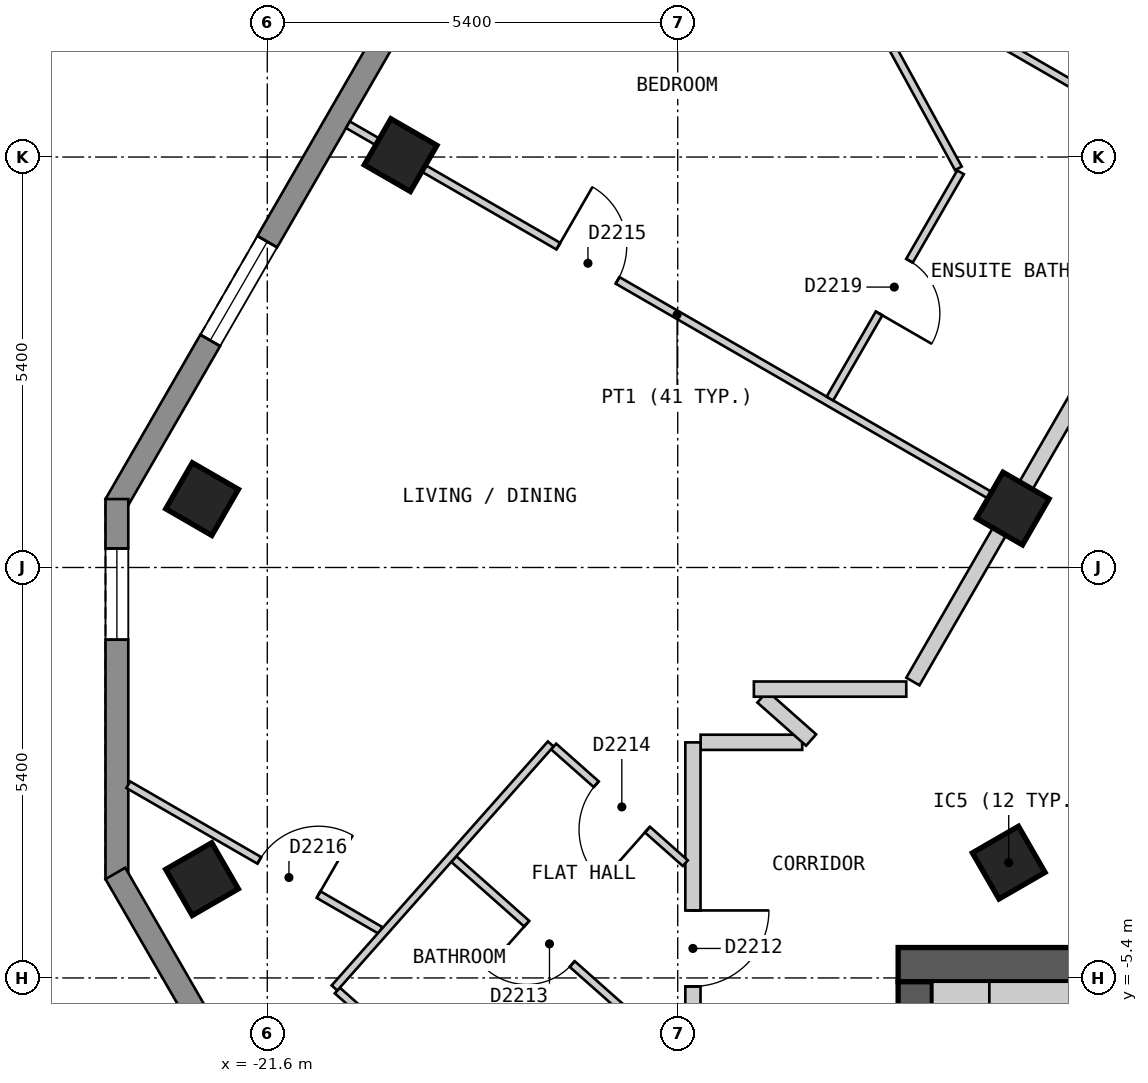
"""IFC4 building model, lengths in metres.
Left out: names, types, materials, properties, quantities, classifications, styles, units other than length and angle.
Written with IfcOpenShell. Run it as: python <this file> out.ifc"""

import sys

from ifc_helpers import new_model, si_unit, direction, frame, frame_2d, origin, origin_2d, place, context, subcontext, project, spatial, polyline, rectangle, outline, extrude, element, fill, save


model = new_model("IFC4")
c1 = context("Model", 3, precision=1e-05, world=origin(), true_north=direction((0.0, 1.0)))
c2 = subcontext(c1, "Body", "Model", "MODEL_VIEW")
j1 = project(units=[si_unit("LENGTHUNIT", "METRE"), si_unit("PLANEANGLEUNIT", "RADIAN")], contexts=[c1])
p1 = place(None, origin())
s1 = spatial("IfcSite", under=j1, at=p1, CompositionType="ELEMENT")
p2 = place(p1, origin())
s2 = spatial("IfcBuilding", under=s1, at=p2, CompositionType="ELEMENT")
p3 = place(p2, frame((0.0, 0.0, 229.8)))
s3 = spatial("IfcBuildingStorey", under=s2, at=p3, CompositionType="ELEMENT", Elevation=229.8)
for number, where, z_axis, x_axis in (
    (1, (-19.846, 5.425, 0.0), (0.0, 0.0, 1.0), (-0.5, -0.866, 0.0)),
    (2, (-22.458, 0.9, 0.0), (0.0, 0.0, 1.0), (-0.5, -0.866, 0.0)),
    (3, (-22.459, -4.1, 0.0), (0.0, 0.0, 1.0), (0.5, -0.866, 0.0)),
    (4, (-11.845, -3.883, 0.0), (0.0, 0.0, 1.0), (0.5, -0.866, 0.0)),
    (5, (-11.792, 0.775, 0.0), (0.0, 0.0, 1.0), (-0.5, -0.866, 0.0)),
):
    element("IfcColumn", number, at=place(p3, frame(where, z_axis=z_axis, x_axis=x_axis)), inside=s3, PredefinedType="COLUMN", context=c2, shape_type="SweptSolid", body=[
        extrude(rectangle(XDim=0.7, YDim=0.7, at=origin_2d()), origin(), (0.0, 0.0, 1.0), 3.0),
    ])
p4 = place(p3, frame((-13.3, -5.225, 0.0), z_axis=(0.0, 0.0, 1.0), x_axis=(1.0, 0.0, 0.0)))
e6 = element("IfcWall", 6, at=p4, inside=s3, PredefinedType="SHEAR", context=c2, shape_type="SweptSolid", body=[
    extrude(rectangle(XDim=26.6, YDim=0.45, at=frame_2d((13.3, 0.0))), origin(), (0.0, 0.0, 1.0), 2.7),
])
p5 = place(p4, frame((23.65, 0.0, 0.0)))
e7 = element("IfcOpeningElement", 7, at=p5, cuts=e6, PredefinedType="OPENING", context=c2, shape_type="SweptSolid", body=[
    extrude(rectangle(XDim=1.2, YDim=2.1, at=frame_2d((0.6, 1.05))), frame((0.0, 0.235, 0.0), z_axis=(0.0, -1.0, 0.0), x_axis=(1.0, 0.0, 0.0)), (0.0, 0.0, 1.0), 0.47),
])
p6 = place(p3, frame((-13.075, -18.55, 0.0), z_axis=(0.0, 0.0, 1.0), x_axis=(0.0, 1.0, 0.0)))
e8 = element("IfcWall", 8, at=p6, inside=s3, PredefinedType="SHEAR", context=c2, shape_type="SweptSolid", body=[
    extrude(rectangle(XDim=13.1, YDim=0.45, at=frame_2d((6.55, 0.0))), origin(), (0.0, 0.0, 1.0), 2.7),
])
p7 = place(p6, frame((4.35, 0.0, 0.0)))
e9 = element("IfcOpeningElement", 9, at=p7, cuts=e8, PredefinedType="OPENING", context=c2, shape_type="SweptSolid", body=[
    extrude(rectangle(XDim=1.2, YDim=2.1, at=frame_2d((0.6, 1.05))), frame((0.0, 0.235, 0.0), z_axis=(0.0, -1.0, 0.0), x_axis=(1.0, 0.0, 0.0)), (0.0, 0.0, 1.0), 0.47),
])
p8 = place(p3, frame((-12.514, 20.025, 0.0), z_axis=(0.0, 0.0, 1.0), x_axis=(-0.500003656944, -0.866023292436, 0.0)))
e10 = element("IfcWall", 10, at=p8, inside=s3, PredefinedType="SOLIDWALL", context=c2, shape_type="SweptSolid", body=[
    extrude(outline(polyline([(0.0, -0.15), (22.17, -0.15), (22.09, 0.15), (0.08, 0.15), (0.0, -0.15)])), origin(), (0.0, 0.0, 1.0), 2.7),
])
p9 = place(p8, frame((2.497, 0.0, 0.15)))
e11 = element("IfcOpeningElement", 11, at=p9, cuts=e10, PredefinedType="OPENING", context=c2, shape_type="SweptSolid", body=[
    extrude(rectangle(XDim=1.5, YDim=2.1, at=frame_2d((0.75, 1.05))), frame((0.0, 0.16, 0.0), z_axis=(0.0, -1.0, 0.0), x_axis=(1.0, 0.0, 0.0)), (0.0, 0.0, 1.0), 0.32),
])
p10 = place(p8, frame((7.722, 0.0, 0.15)))
e12 = element("IfcOpeningElement", 12, at=p10, cuts=e10, PredefinedType="OPENING", context=c2, shape_type="SweptSolid", body=[
    extrude(rectangle(XDim=1.5, YDim=2.1, at=frame_2d((0.75, 1.05))), frame((0.0, 0.16, 0.0), z_axis=(0.0, -1.0, 0.0), x_axis=(1.0, 0.0, 0.0)), (0.0, 0.0, 1.0), 0.32),
])
p11 = place(p8, frame((12.948, 0.0, 0.15)))
e13 = element("IfcOpeningElement", 13, at=p11, cuts=e10, PredefinedType="OPENING", context=c2, shape_type="SweptSolid", body=[
    extrude(rectangle(XDim=1.5, YDim=2.1, at=frame_2d((0.75, 1.05))), frame((0.0, 0.16, 0.0), z_axis=(0.0, -1.0, 0.0), x_axis=(1.0, 0.0, 0.0)), (0.0, 0.0, 1.0), 0.32),
])
p12 = place(p8, frame((18.173, 0.0, 0.15)))
e14 = element("IfcOpeningElement", 14, at=p12, cuts=e10, PredefinedType="OPENING", context=c2, shape_type="SweptSolid", body=[
    extrude(rectangle(XDim=1.5, YDim=2.1, at=frame_2d((0.75, 1.05))), frame((0.0, 0.16, 0.0), z_axis=(0.0, -1.0, 0.0), x_axis=(1.0, 0.0, 0.0)), (0.0, 0.0, 1.0), 0.32),
])
p13 = place(p3, frame((-23.579, 0.9, 0.0), z_axis=(0.0, 0.0, 1.0), x_axis=(0.0, -1.0, 0.0)))
e15 = element("IfcWall", 15, at=p13, inside=s3, PredefinedType="SOLIDWALL", context=c2, shape_type="SweptSolid", body=[
    extrude(outline(polyline([(0.0, -0.15), (5.0, -0.15), (4.92, 0.15), (0.08, 0.15), (0.0, -0.15)])), origin(), (0.0, 0.0, 1.0), 2.7),
])
p14 = place(p13, frame((0.65, 0.0, 0.15)))
e16 = element("IfcOpeningElement", 16, at=p14, cuts=e15, PredefinedType="OPENING", context=c2, shape_type="SweptSolid", body=[
    extrude(rectangle(XDim=1.2, YDim=2.1, at=frame_2d((0.6, 1.05))), frame((0.0, 0.16, 0.0), z_axis=(0.0, -1.0, 0.0), x_axis=(1.0, 0.0, 0.0)), (0.0, 0.0, 1.0), 0.32),
])
p15 = place(p3, frame((-23.599, -4.025, 0.0), z_axis=(0.0, 0.0, 1.0), x_axis=(0.500012653391, -0.866018098222, 0.0)))
e17 = element("IfcWall", 17, at=p15, inside=s3, PredefinedType="SOLIDWALL", context=c2, shape_type="SweptSolid", body=[
    extrude(outline(polyline([(0.0, -0.15), (16.628, -0.15), (16.548, 0.15), (0.08, 0.15), (0.0, -0.15)])), origin(), (0.0, 0.0, 1.0), 2.7),
])
p16 = place(p15, frame((2.444, 0.0, 0.15)))
e18 = element("IfcOpeningElement", 18, at=p16, cuts=e17, PredefinedType="OPENING", context=c2, shape_type="SweptSolid", body=[
    extrude(rectangle(XDim=1.5, YDim=2.1, at=frame_2d((0.75, 1.05))), frame((0.0, 0.16, 0.0), z_axis=(0.0, -1.0, 0.0), x_axis=(1.0, 0.0, 0.0)), (0.0, 0.0, 1.0), 0.32),
])
p17 = place(p15, frame((7.564, 0.0, 0.15)))
e19 = element("IfcOpeningElement", 19, at=p17, cuts=e17, PredefinedType="OPENING", context=c2, shape_type="SweptSolid", body=[
    extrude(rectangle(XDim=1.5, YDim=2.1, at=frame_2d((0.75, 1.05))), frame((0.0, 0.16, 0.0), z_axis=(0.0, -1.0, 0.0), x_axis=(1.0, 0.0, 0.0)), (0.0, 0.0, 1.0), 0.32),
])
p18 = place(p15, frame((12.682, 0.0, 0.15)))
e20 = element("IfcOpeningElement", 20, at=p18, cuts=e17, PredefinedType="OPENING", context=c2, shape_type="SweptSolid", body=[
    extrude(rectangle(XDim=1.5, YDim=2.1, at=frame_2d((0.75, 1.05))), frame((0.0, 0.16, 0.0), z_axis=(0.0, -1.0, 0.0), x_axis=(1.0, 0.0, 0.0)), (0.0, 0.0, 1.0), 0.32),
])
p19 = place(p3, frame((-15.899, -2.3, 0.0), z_axis=(0.0, 0.0, 1.0), x_axis=(1.0, 0.0, 0.0)))
e21 = element("IfcWall", 21, at=p19, inside=s3, PredefinedType="PARTITIONING", context=c2, shape_type="SweptSolid", body=[
    extrude(rectangle(XDim=1.337, YDim=0.2, at=frame_2d((0.668, 0.0))), origin(), (0.0, 0.0, 1.0), 2.7),
])
p20 = place(p3, frame((-13.106, -1.5, 0.0), z_axis=(0.0, 0.0, 1.0), x_axis=(0.500025705601, 0.86601056214, 0.0)))
e22 = element("IfcWall", 22, at=p20, inside=s3, PredefinedType="PARTITIONING", context=c2, shape_type="SweptSolid", body=[
    extrude(rectangle(XDim=7.735, YDim=0.2, at=frame_2d((3.868, 0.0))), origin(), (0.0, 0.0, 1.0), 2.7),
])
p21 = place(p3, frame((-16.0, -6.099, 0.0), z_axis=(0.0, 0.0, 1.0), x_axis=(0.0, 1.0, 0.0)))
e23 = element("IfcWall", 23, at=p21, inside=s3, PredefinedType="PARTITIONING", context=c2, shape_type="SweptSolid", body=[
    extrude(rectangle(XDim=3.798, YDim=0.2, at=frame_2d((1.899, 0.0))), origin(), (0.0, 0.0, 1.0), 2.7),
])
p22 = place(p21, frame((0.587, 0.0, 0.0)))
e24 = element("IfcOpeningElement", 24, at=p22, cuts=e23, PredefinedType="OPENING", context=c2, shape_type="SweptSolid", body=[
    extrude(rectangle(XDim=1.0, YDim=2.1, at=frame_2d((0.5, 1.05))), frame((0.0, 0.11, 0.0), z_axis=(0.0, -1.0, 0.0), x_axis=(1.0, 0.0, 0.0)), (0.0, 0.0, 1.0), 0.22),
])
p23 = place(p3, frame((-14.012, 8.0, 0.0), z_axis=(0.0, 0.0, 1.0), x_axis=(0.480183343847, -0.877168145963, 0.0)))
e25 = element("IfcWall", 25, at=p23, inside=s3, PredefinedType="PARTITIONING", context=c2, shape_type="SweptSolid", body=[
    extrude(rectangle(XDim=3.134, YDim=0.1, at=frame_2d((1.567, 0.0))), origin(), (0.0, 0.0, 1.0), 2.7),
])
p24 = place(p3, frame((-20.539, 5.825, 0.0), z_axis=(0.0, 0.0, 1.0), x_axis=(0.866089650643, -0.499888704662, 0.0)))
e26 = element("IfcWall", 26, at=p24, inside=s3, PredefinedType="PARTITIONING", context=c2, shape_type="SweptSolid", body=[
    extrude(rectangle(XDim=10.0, YDim=0.1, at=frame_2d((5.0, 0.0))), origin(), (0.0, 0.0, 1.0), 2.7),
])
p25 = place(p24, frame((3.196, 0.0, 0.0)))
e27 = element("IfcOpeningElement", 27, at=p25, cuts=e26, PredefinedType="OPENING", context=c2, shape_type="SweptSolid", body=[
    extrude(rectangle(XDim=0.9, YDim=2.1, at=frame_2d((0.45, 1.05))), frame((0.0, 0.06, 0.0), z_axis=(0.0, -1.0, 0.0), x_axis=(1.0, 0.0, 0.0)), (0.0, 0.0, 1.0), 0.12),
])
p26 = place(p3, frame((-23.429, -2.858, 0.0), z_axis=(0.0, 0.0, 1.0), x_axis=(0.8659754619, -0.500086491905, 0.0)))
e28 = element("IfcWall", 28, at=p26, inside=s3, PredefinedType="PARTITIONING", context=c2, shape_type="SweptSolid", body=[
    extrude(rectangle(XDim=3.831, YDim=0.1, at=frame_2d((1.916, 0.0))), origin(), (0.0, 0.0, 1.0), 2.7),
])
p27 = place(p26, frame((1.991, 0.0, 0.0)))
e29 = element("IfcOpeningElement", 29, at=p27, cuts=e28, PredefinedType="OPENING", context=c2, shape_type="SweptSolid", body=[
    extrude(rectangle(XDim=0.9, YDim=2.1, at=frame_2d((0.45, 1.05))), frame((0.0, 0.06, 0.0), z_axis=(0.0, -1.0, 0.0), x_axis=(1.0, 0.0, 0.0)), (0.0, 0.0, 1.0), 0.12),
])
p28 = place(p3, frame((-17.926, 10.35, 0.0), z_axis=(0.0, 0.0, 1.0), x_axis=(0.866018411306, -0.500012111133, 0.0)))
e30 = element("IfcWall", 30, at=p28, inside=s3, PredefinedType="PARTITIONING", context=c2, shape_type="SweptSolid", body=[
    extrude(rectangle(XDim=9.898, YDim=0.1, at=frame_2d((4.949, 0.0))), origin(), (0.0, 0.0, 1.0), 2.7),
])
p29 = place(p28, frame((1.83, 0.0, 0.0)))
e31 = element("IfcOpeningElement", 31, at=p29, cuts=e30, PredefinedType="OPENING", context=c2, shape_type="SweptSolid", body=[
    extrude(rectangle(XDim=0.9, YDim=2.1, at=frame_2d((0.45, 1.05))), frame((0.0, 0.06, 0.0), z_axis=(0.0, -1.0, 0.0), x_axis=(1.0, 0.0, 0.0)), (0.0, 0.0, 1.0), 0.12),
])
p30 = place(p3, frame((-17.833, -2.355, 0.0), z_axis=(0.0, 0.0, 1.0), x_axis=(0.748577710953, -0.663047065196, 0.0)))
e32 = element("IfcWall", 32, at=p30, inside=s3, PredefinedType="PARTITIONING", context=c2, shape_type="SweptSolid", body=[
    extrude(rectangle(XDim=2.315, YDim=0.1, at=frame_2d((1.157, 0.0))), origin(), (0.0, 0.0, 1.0), 2.7),
])
p31 = place(p30, frame((0.749, 0.0, 0.0)))
e33 = element("IfcOpeningElement", 33, at=p31, cuts=e32, PredefinedType="OPENING", context=c2, shape_type="SweptSolid", body=[
    extrude(rectangle(XDim=0.9, YDim=2.1, at=frame_2d((0.45, 1.05))), frame((0.0, 0.06, 0.0), z_axis=(0.0, -1.0, 0.0), x_axis=(1.0, 0.0, 0.0)), (0.0, 0.0, 1.0), 0.12),
])
p32 = place(p3, frame((-19.146, -3.836, 0.0), z_axis=(0.0, 0.0, 1.0), x_axis=(0.748267567437, -0.663397051186, 0.0)))
e34 = element("IfcWall", 34, at=p32, inside=s3, PredefinedType="PARTITIONING", context=c2, shape_type="SweptSolid", body=[
    extrude(rectangle(XDim=3.262, YDim=0.1, at=frame_2d((1.631, 0.0))), origin(), (0.0, 0.0, 1.0), 2.7),
])
p33 = place(p32, frame((1.282, 0.0, 0.0)))
e35 = element("IfcOpeningElement", 35, at=p33, cuts=e34, PredefinedType="OPENING", context=c2, shape_type="SweptSolid", body=[
    extrude(rectangle(XDim=0.8, YDim=2.1, at=frame_2d((0.4, 1.05))), frame((0.0, 0.06, 0.0), z_axis=(0.0, -1.0, 0.0), x_axis=(1.0, 0.0, 0.0)), (0.0, 0.0, 1.0), 0.12),
])
p34 = place(p3, frame((-20.679, -5.565, 0.0), z_axis=(0.0, 0.0, 1.0), x_axis=(0.748495475416, -0.663139897217, 0.0)))
e36 = element("IfcWall", 36, at=p34, inside=s3, PredefinedType="PARTITIONING", context=c2, shape_type="SweptSolid", body=[
    extrude(rectangle(XDim=2.577, YDim=0.1, at=frame_2d((1.289, 0.0))), origin(), (0.0, 0.0, 1.0), 2.7),
])
p35 = place(p3, frame((-14.198, 2.222, 0.0), z_axis=(0.0, 0.0, 1.0), x_axis=(0.500042121486, 0.866001083567, 0.0)))
e37 = element("IfcWall", 37, at=p35, inside=s3, PredefinedType="PARTITIONING", context=c2, shape_type="SweptSolid", body=[
    extrude(rectangle(XDim=3.438, YDim=0.1, at=frame_2d((1.719, 0.0))), origin(), (0.0, 0.0, 1.0), 2.7),
])
p36 = place(p35, frame((1.294, 0.0, 0.0)))
e38 = element("IfcOpeningElement", 38, at=p36, cuts=e37, PredefinedType="OPENING", context=c2, shape_type="SweptSolid", body=[
    extrude(rectangle(XDim=0.8, YDim=2.1, at=frame_2d((0.4, 1.05))), frame((0.0, 0.06, 0.0), z_axis=(0.0, -1.0, 0.0), x_axis=(1.0, 0.0, 0.0)), (0.0, 0.0, 1.0), 0.12),
])
p37 = place(p3, frame((-20.716, -5.532, 0.0), z_axis=(0.0, 0.0, 1.0), x_axis=(0.663278535613, 0.748372623895, 0.0)))
e39 = element("IfcWall", 39, at=p37, inside=s3, PredefinedType="PARTITIONING", context=c2, shape_type="SweptSolid", body=[
    extrude(rectangle(XDim=4.289, YDim=0.1, at=frame_2d((2.145, 0.0))), origin(), (0.0, 0.0, 1.0), 2.7),
])
p38 = place(p3, frame((-15.086, -1.702, 0.0), z_axis=(0.0, 0.0, 1.0), x_axis=(0.748305129876, -0.663354680846, 0.0)))
e40 = element("IfcWall", 40, at=p38, inside=s3, PredefinedType="PARTITIONING", context=c2, shape_type="SweptSolid", body=[
    extrude(rectangle(XDim=0.856, YDim=0.2, at=frame_2d((0.428, 0.0))), origin(), (0.0, 0.0, 1.0), 2.7),
])
p39 = place(p3, frame((-15.198, -1.6, 0.0), z_axis=(0.0, 0.0, 1.0), x_axis=(1.0, 0.0, 0.0)))
e41 = element("IfcWall", 41, at=p39, inside=s3, PredefinedType="PARTITIONING", context=c2, shape_type="SweptSolid", body=[
    extrude(rectangle(XDim=2.005, YDim=0.2, at=frame_2d((1.002, 0.0))), origin(), (0.0, 0.0, 1.0), 2.7),
])
p40 = place(p3, frame((-12.475, -9.15, 0.0), z_axis=(0.0, 0.0, 1.0), x_axis=(0.0, 1.0, 0.0)))
e42 = element("IfcWall", 42, at=p40, inside=s3, PredefinedType="SOLIDWALL", context=c2, shape_type="SweptSolid", body=[
    extrude(rectangle(XDim=3.7, YDim=0.75, at=frame_2d((1.85, 0.0))), origin(), (0.0, 0.0, 1.0), 2.7),
])
p41 = place(p3, frame((-12.1, -5.825, 0.0), z_axis=(0.0, 0.0, 1.0), x_axis=(1.0, 0.0, 0.0)))
e43 = element("IfcWall", 43, at=p41, inside=s3, PredefinedType="SOLIDWALL", context=c2, shape_type="SweptSolid", body=[
    extrude(rectangle(XDim=5.4, YDim=0.75, at=frame_2d((2.7, 0.0))), origin(), (0.0, 0.0, 1.0), 2.7),
])
p42 = place(p12, origin())
e44 = element("IfcWindow", 44, at=p42, inside=s3, PartitioningType="SINGLE_PANEL", PredefinedType="WINDOW", context=c2, shape_type="SweptSolid", body=[
    extrude(rectangle(XDim=1.5, YDim=2.1, at=frame_2d((0.75, 1.05))), frame((0.0, 0.03, 0.0), z_axis=(0.0, -1.0, 0.0), x_axis=(1.0, 0.0, 0.0)), (0.0, 0.0, 1.0), 0.06),
])
fill(e14, e44)
p43 = place(p14, origin())
e45 = element("IfcWindow", 45, at=p43, inside=s3, PartitioningType="SINGLE_PANEL", PredefinedType="WINDOW", context=c2, shape_type="SweptSolid", body=[
    extrude(rectangle(XDim=1.2, YDim=2.1, at=frame_2d((0.6, 1.05))), frame((0.0, 0.03, 0.0), z_axis=(0.0, -1.0, 0.0), x_axis=(1.0, 0.0, 0.0)), (0.0, 0.0, 1.0), 0.06),
])
fill(e16, e45)
p44 = place(p22, origin())
e46 = element("IfcDoor", 46, at=p44, inside=s3, OperationType="SINGLE_SWING_RIGHT", PredefinedType="DOOR", context=c2, shape_type="SweptSolid", body=[
    extrude(rectangle(XDim=1.0, YDim=2.1, at=frame_2d((0.5, 1.05))), frame((0.0, 0.025, 0.0), z_axis=(0.0, -1.0, 0.0), x_axis=(1.0, 0.0, 0.0)), (0.0, 0.0, 1.0), 0.05),
])
fill(e24, e46)
p45 = place(p33, origin())
e47 = element("IfcDoor", 47, at=p45, inside=s3, OperationType="SINGLE_SWING_LEFT", PredefinedType="DOOR", context=c2, shape_type="SweptSolid", body=[
    extrude(rectangle(XDim=0.8, YDim=2.1, at=frame_2d((0.4, 1.05))), frame((0.0, 0.025, 0.0), z_axis=(0.0, -1.0, 0.0), x_axis=(1.0, 0.0, 0.0)), (0.0, 0.0, 1.0), 0.05),
])
fill(e35, e47)
p46 = place(p31, origin())
e48 = element("IfcDoor", 48, at=p46, inside=s3, OperationType="SINGLE_SWING_RIGHT", PredefinedType="DOOR", context=c2, shape_type="SweptSolid", body=[
    extrude(rectangle(XDim=0.9, YDim=2.1, at=frame_2d((0.45, 1.05))), frame((0.0, 0.025, 0.0), z_axis=(0.0, -1.0, 0.0), x_axis=(1.0, 0.0, 0.0)), (0.0, 0.0, 1.0), 0.05),
])
fill(e33, e48)
p47 = place(p25, origin())
e49 = element("IfcDoor", 49, at=p47, inside=s3, OperationType="SINGLE_SWING_LEFT", PredefinedType="DOOR", context=c2, shape_type="SweptSolid", body=[
    extrude(rectangle(XDim=0.9, YDim=2.1, at=frame_2d((0.45, 1.05))), frame((0.0, 0.025, 0.0), z_axis=(0.0, -1.0, 0.0), x_axis=(1.0, 0.0, 0.0)), (0.0, 0.0, 1.0), 0.05),
])
fill(e27, e49)
p48 = place(p27, origin())
e50 = element("IfcDoor", 50, at=p48, inside=s3, OperationType="SINGLE_SWING_RIGHT", PredefinedType="DOOR", context=c2, shape_type="SweptSolid", body=[
    extrude(rectangle(XDim=0.9, YDim=2.1, at=frame_2d((0.45, 1.05))), frame((0.0, 0.025, 0.0), z_axis=(0.0, -1.0, 0.0), x_axis=(1.0, 0.0, 0.0)), (0.0, 0.0, 1.0), 0.05),
])
fill(e29, e50)
p49 = place(p36, origin())
e51 = element("IfcDoor", 51, at=p49, inside=s3, OperationType="SINGLE_SWING_LEFT", PredefinedType="DOOR", context=c2, shape_type="SweptSolid", body=[
    extrude(rectangle(XDim=0.8, YDim=2.1, at=frame_2d((0.4, 1.05))), frame((0.0, 0.025, 0.0), z_axis=(0.0, -1.0, 0.0), x_axis=(1.0, 0.0, 0.0)), (0.0, 0.0, 1.0), 0.05),
])
fill(e38, e51)
save(model, sys.argv[1])
